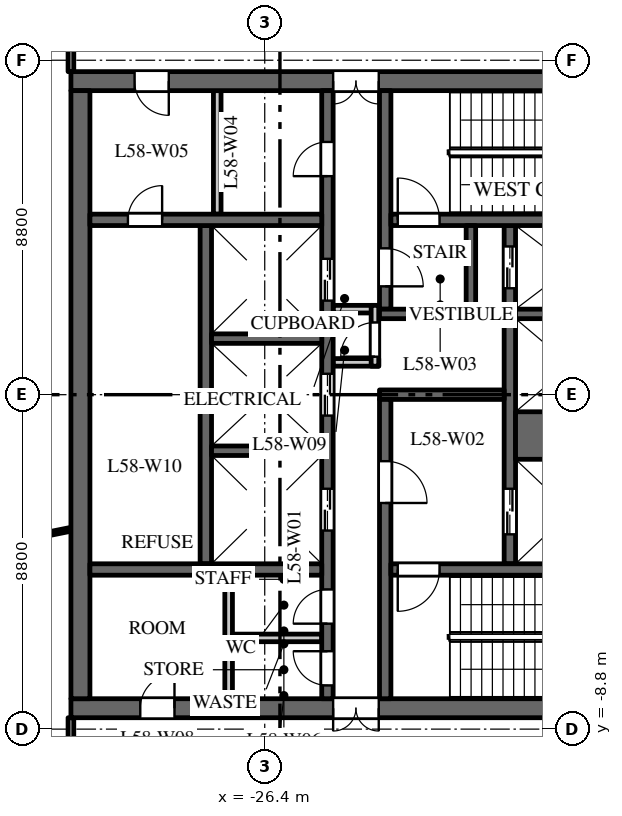
"""IFC4 building model, lengths in metres.
Left out: names, types, materials, properties, quantities, classifications, styles, units other than length and angle.
Written with IfcOpenShell. Run it as: python <this file> out.ifc"""

import sys

from ifc_helpers import new_model, si_unit, direction, frame, frame_2d, origin, place, context, subcontext, project, spatial, rectangle, extrude, element, fill, save


model = new_model("IFC4")
c1 = context("Model", 3, precision=1e-05, world=origin(), true_north=direction((0.0, 1.0)))
c2 = subcontext(c1, "Body", "Model", "MODEL_VIEW")
j1 = project(units=[si_unit("LENGTHUNIT", "METRE"), si_unit("PLANEANGLEUNIT", "RADIAN")], contexts=[c1])
p1 = place(None, origin())
s1 = spatial("IfcSite", under=j1, at=p1, CompositionType="ELEMENT")
p2 = place(p1, origin())
s2 = spatial("IfcBuilding", under=s1, at=p2, CompositionType="ELEMENT")
p3 = place(p2, frame((0.0, 0.0, 273.5)))
s3 = spatial("IfcBuildingStorey", under=s2, at=p3, CompositionType="ELEMENT", Elevation=273.5)
p4 = place(p3, frame((-16.5, 8.25, 0.0), z_axis=(0.0, 0.0, 1.0), x_axis=(-1.0, 0.0, 0.0)))
e1 = element("IfcWall", 1, at=p4, inside=s3, PredefinedType="SHEAR", context=c2, shape_type="SweptSolid", body=[
    extrude(rectangle(XDim=15.0, YDim=0.5, at=frame_2d((7.5, 0.0))), origin(), (0.0, 0.0, 1.0), 3.7),
])
p5 = place(p4, frame((6.9, 0.0, 0.0)))
e2 = element("IfcOpeningElement", 2, at=p5, cuts=e1, PredefinedType="OPENING", context=c2, shape_type="SweptSolid", body=[
    extrude(rectangle(XDim=1.2, YDim=2.1, at=frame_2d((0.6, 1.05))), frame((0.0, 0.26, 0.0), z_axis=(0.0, -1.0, 0.0), x_axis=(1.0, 0.0, 0.0)), (0.0, 0.0, 1.0), 0.52),
])
p6 = place(p4, frame((12.425, 0.0, 0.0)))
e3 = element("IfcOpeningElement", 3, at=p6, cuts=e1, PredefinedType="OPENING", context=c2, shape_type="SweptSolid", body=[
    extrude(rectangle(XDim=0.9, YDim=2.1, at=frame_2d((0.45, 1.05))), frame((0.0, 0.26, 0.0), z_axis=(0.0, -1.0, 0.0), x_axis=(1.0, 0.0, 0.0)), (0.0, 0.0, 1.0), 0.52),
])
p7 = place(p3, frame((-16.5, -8.25, 0.0), z_axis=(0.0, 0.0, 1.0), x_axis=(-1.0, 0.0, 0.0)))
e4 = element("IfcWall", 4, at=p7, inside=s3, PredefinedType="SHEAR", context=c2, shape_type="SweptSolid", body=[
    extrude(rectangle(XDim=15.0, YDim=0.5, at=frame_2d((7.5, 0.0))), origin(), (0.0, 0.0, 1.0), 3.7),
])
p8 = place(p7, frame((6.9, 0.0, 0.0)))
e5 = element("IfcOpeningElement", 5, at=p8, cuts=e4, PredefinedType="OPENING", context=c2, shape_type="SweptSolid", body=[
    extrude(rectangle(XDim=1.2, YDim=2.1, at=frame_2d((0.6, 1.05))), frame((0.0, 0.26, 0.0), z_axis=(0.0, -1.0, 0.0), x_axis=(1.0, 0.0, 0.0)), (0.0, 0.0, 1.0), 0.52),
])
p9 = place(p7, frame((12.275, 0.0, 0.0)))
e6 = element("IfcOpeningElement", 6, at=p9, cuts=e4, PredefinedType="OPENING", context=c2, shape_type="SweptSolid", body=[
    extrude(rectangle(XDim=0.9, YDim=2.1, at=frame_2d((0.45, 1.05))), frame((0.0, 0.26, 0.0), z_axis=(0.0, -1.0, 0.0), x_axis=(1.0, 0.0, 0.0)), (0.0, 0.0, 1.0), 0.52),
])
p10 = place(p3, frame((-27.95, -4.45, 0.0), z_axis=(0.0, 0.0, 1.0), x_axis=(0.0, 1.0, 0.0)))
e7 = element("IfcWall", 7, at=p10, inside=s3, PredefinedType="SHEAR", context=c2, shape_type="SweptSolid", body=[
    extrude(rectangle(XDim=8.9, YDim=0.3, at=frame_2d((4.45, 0.0))), origin(), (0.0, 0.0, 1.0), 3.7),
])
p11 = place(p3, frame((-19.95, -4.45, 0.0), z_axis=(0.0, 0.0, 1.0), x_axis=(0.0, 1.0, 0.0)))
e8 = element("IfcWall", 8, at=p11, inside=s3, PredefinedType="SHEAR", context=c2, shape_type="SweptSolid", body=[
    extrude(rectangle(XDim=8.9, YDim=0.3, at=frame_2d((4.45, 0.0))), origin(), (0.0, 0.0, 1.0), 3.7),
])
p12 = place(p11, frame((0.775, 0.0, 0.0)))
e9 = element("IfcOpeningElement", 9, at=p12, cuts=e8, PredefinedType="OPENING", context=c2, shape_type="SweptSolid", body=[
    extrude(rectangle(XDim=1.2, YDim=2.1, at=frame_2d((0.6, 1.05))), frame((0.0, 0.16, 0.0), z_axis=(0.0, -1.0, 0.0), x_axis=(1.0, 0.0, 0.0)), (0.0, 0.0, 1.0), 0.32),
])
p13 = place(p11, frame((7.25, 0.0, 0.0)))
e10 = element("IfcOpeningElement", 10, at=p13, cuts=e8, PredefinedType="OPENING", context=c2, shape_type="SweptSolid", body=[
    extrude(rectangle(XDim=1.1, YDim=2.1, at=frame_2d((0.55, 1.05))), frame((0.0, 0.16, 0.0), z_axis=(0.0, -1.0, 0.0), x_axis=(1.0, 0.0, 0.0)), (0.0, 0.0, 1.0), 0.32),
])
p14 = place(p3, frame((-24.75, -8.0, 0.0), z_axis=(0.0, 0.0, 1.0), x_axis=(0.0, 1.0, 0.0)))
e11 = element("IfcWall", 11, at=p14, inside=s3, PredefinedType="SHEAR", context=c2, shape_type="SweptSolid", body=[
    extrude(rectangle(XDim=16.0, YDim=0.3, at=frame_2d((8.0, 0.0))), origin(), (0.0, 0.0, 1.0), 3.7),
])
p15 = place(p14, frame((4.425, 0.0, 0.0)))
e12 = element("IfcOpeningElement", 12, at=p15, cuts=e11, PredefinedType="OPENING", context=c2, shape_type="SweptSolid", body=[
    extrude(rectangle(XDim=1.1, YDim=2.1, at=frame_2d((0.55, 1.05))), frame((0.0, 0.16, 0.0), z_axis=(0.0, -1.0, 0.0), x_axis=(1.0, 0.0, 0.0)), (0.0, 0.0, 1.0), 0.32),
])
p16 = place(p14, frame((7.45, 0.0, 0.0)))
e13 = element("IfcOpeningElement", 13, at=p16, cuts=e11, PredefinedType="OPENING", context=c2, shape_type="SweptSolid", body=[
    extrude(rectangle(XDim=1.1, YDim=2.1, at=frame_2d((0.55, 1.05))), frame((0.0, 0.16, 0.0), z_axis=(0.0, -1.0, 0.0), x_axis=(1.0, 0.0, 0.0)), (0.0, 0.0, 1.0), 0.32),
])
p17 = place(p14, frame((10.475, 0.0, 0.0)))
e14 = element("IfcOpeningElement", 14, at=p17, cuts=e11, PredefinedType="OPENING", context=c2, shape_type="SweptSolid", body=[
    extrude(rectangle(XDim=1.1, YDim=2.1, at=frame_2d((0.55, 1.05))), frame((0.0, 0.16, 0.0), z_axis=(0.0, -1.0, 0.0), x_axis=(1.0, 0.0, 0.0)), (0.0, 0.0, 1.0), 0.32),
])
p18 = place(p14, frame((13.75, 0.0, 0.0)))
e15 = element("IfcOpeningElement", 15, at=p18, cuts=e11, PredefinedType="OPENING", context=c2, shape_type="SweptSolid", body=[
    extrude(rectangle(XDim=0.9, YDim=2.1, at=frame_2d((0.45, 1.05))), frame((0.0, 0.16, 0.0), z_axis=(0.0, -1.0, 0.0), x_axis=(1.0, 0.0, 0.0)), (0.0, 0.0, 1.0), 0.32),
])
p19 = place(p14, frame((1.975, 0.0, 0.0)))
e16 = element("IfcOpeningElement", 16, at=p19, cuts=e11, PredefinedType="OPENING", context=c2, shape_type="SweptSolid", body=[
    extrude(rectangle(XDim=0.9, YDim=2.1, at=frame_2d((0.45, 1.05))), frame((0.0, 0.16, 0.0), z_axis=(0.0, -1.0, 0.0), x_axis=(1.0, 0.0, 0.0)), (0.0, 0.0, 1.0), 0.32),
])
p20 = place(p14, frame((0.35, 0.0, 0.0)))
e17 = element("IfcOpeningElement", 17, at=p20, cuts=e11, PredefinedType="OPENING", context=c2, shape_type="SweptSolid", body=[
    extrude(rectangle(XDim=0.9, YDim=2.1, at=frame_2d((0.45, 1.05))), frame((0.0, 0.16, 0.0), z_axis=(0.0, -1.0, 0.0), x_axis=(1.0, 0.0, 0.0)), (0.0, 0.0, 1.0), 0.32),
])
p21 = place(p3, frame((-20.1, 0.0, 0.0), z_axis=(0.0, 0.0, 1.0), x_axis=(-1.0, 0.0, 0.0)))
e18 = element("IfcWall", 18, at=p21, inside=s3, PredefinedType="SHEAR", context=c2, shape_type="SweptSolid", body=[
    extrude(rectangle(XDim=3.28, YDim=0.25, at=frame_2d((1.64, 0.0))), origin(), (0.0, 0.0, 1.0), 3.7),
])
for number, where, z_axis, x_axis in (
    (19, (-23.4, 0.85, 0.0), (0.0, 0.0, 1.0), (-1.0, 0.0, 0.0)),
    (20, (-23.4, 2.25, 0.0), (0.0, 0.0, 1.0), (-1.0, 0.0, 0.0)),
):
    element("IfcWall", number, at=place(p3, frame(where, z_axis=z_axis, x_axis=x_axis)), inside=s3, PredefinedType="PARTITIONING", context=c2, shape_type="SweptSolid", body=[
        extrude(rectangle(XDim=1.2, YDim=0.2, at=frame_2d((0.6, 0.0))), origin(), (0.0, 0.0, 1.0), 3.7),
    ])
p22 = place(p3, frame((-23.5, 0.75, 0.0), z_axis=(0.0, 0.0, 1.0), x_axis=(0.0, 1.0, 0.0)))
e21 = element("IfcWall", 21, at=p22, inside=s3, PredefinedType="PARTITIONING", context=c2, shape_type="SweptSolid", body=[
    extrude(rectangle(XDim=1.6, YDim=0.2, at=frame_2d((0.8, 0.0))), origin(), (0.0, 0.0, 1.0), 3.7),
])
p23 = place(p22, frame((0.25, 0.0, 0.0)))
e22 = element("IfcOpeningElement", 22, at=p23, cuts=e21, PredefinedType="OPENING", context=c2, shape_type="SweptSolid", body=[
    extrude(rectangle(XDim=0.9, YDim=2.1, at=frame_2d((0.45, 1.05))), frame((0.0, 0.11, 0.0), z_axis=(0.0, -1.0, 0.0), x_axis=(1.0, 0.0, 0.0)), (0.0, 0.0, 1.0), 0.22),
])
p24 = place(p3, frame((-31.25, -8.0, 0.0), z_axis=(0.0, 0.0, 1.0), x_axis=(0.0, 1.0, 0.0)))
e23 = element("IfcWall", 23, at=p24, inside=s3, PredefinedType="SHEAR", context=c2, shape_type="SweptSolid", body=[
    extrude(rectangle(XDim=16.0, YDim=0.5, at=frame_2d((8.0, 0.0))), origin(), (0.0, 0.0, 1.0), 3.7),
])
p25 = place(p3, frame((-24.9, 4.6, 0.0), z_axis=(0.0, 0.0, 1.0), x_axis=(-1.0, 0.0, 0.0)))
e24 = element("IfcWall", 24, at=p25, inside=s3, PredefinedType="SHEAR", context=c2, shape_type="SweptSolid", body=[
    extrude(rectangle(XDim=6.1, YDim=0.3, at=frame_2d((3.05, 0.0))), origin(), (0.0, 0.0, 1.0), 3.7),
])
p26 = place(p25, frame((4.2, 0.0, 0.0)))
e25 = element("IfcOpeningElement", 25, at=p26, cuts=e24, PredefinedType="OPENING", context=c2, shape_type="SweptSolid", body=[
    extrude(rectangle(XDim=0.9, YDim=2.1, at=frame_2d((0.45, 1.05))), frame((0.0, 0.16, 0.0), z_axis=(0.0, -1.0, 0.0), x_axis=(1.0, 0.0, 0.0)), (0.0, 0.0, 1.0), 0.32),
])
for number, where, z_axis, x_axis in (
    (26, (-27.65, 4.75, 0.0), (0.0, 0.0, 1.0), (0.0, 1.0, 0.0)),
    (27, (-27.35, -8.0, 0.0), (0.0, 0.0, 1.0), (0.0, 1.0, 0.0)),
):
    element("IfcWall", number, at=place(p3, frame(where, z_axis=z_axis, x_axis=x_axis)), inside=s3, PredefinedType="PARTITIONING", context=c2, shape_type="SweptSolid", body=[
        extrude(rectangle(XDim=3.25, YDim=0.2, at=frame_2d((1.625, 0.0))), origin(), (0.0, 0.0, 1.0), 3.7),
    ])
p27 = place(p3, frame((-24.9, -6.4, 0.0), z_axis=(0.0, 0.0, 1.0), x_axis=(-1.0, 0.0, 0.0)))
e28 = element("IfcWall", 28, at=p27, inside=s3, PredefinedType="PARTITIONING", context=c2, shape_type="SweptSolid", body=[
    extrude(rectangle(XDim=2.35, YDim=0.2, at=frame_2d((1.175, 0.0))), origin(), (0.0, 0.0, 1.0), 3.7),
])
p28 = place(p3, frame((-24.9, -4.6, 0.0), z_axis=(0.0, 0.0, 1.0), x_axis=(-1.0, 0.0, 0.0)))
e29 = element("IfcWall", 29, at=p28, inside=s3, PredefinedType="SHEAR", context=c2, shape_type="SweptSolid", body=[
    extrude(rectangle(XDim=6.1, YDim=0.3, at=frame_2d((3.05, 0.0))), origin(), (0.0, 0.0, 1.0), 3.7),
])
p29 = place(p3, frame((-16.9, -1.075, 0.0), z_axis=(0.0, 0.0, 1.0), x_axis=(-1.0, 0.0, 0.0)))
e30 = element("IfcWall", 30, at=p29, inside=s3, PredefinedType="SHEAR", context=c2, shape_type="SweptSolid", body=[
    extrude(rectangle(XDim=2.9, YDim=1.25, at=frame_2d((1.45, 0.0))), origin(), (0.0, 0.0, 1.0), 3.7),
])
for number, where, z_axis, x_axis in (
    (31, (-16.9, 2.125, 0.0), (0.0, 0.0, 1.0), (-1.0, 0.0, 0.0)),
    (32, (-24.9, -1.475, 0.0), (0.0, 0.0, 1.0), (-1.0, 0.0, 0.0)),
    (33, (-24.9, 1.475, 0.0), (0.0, 0.0, 1.0), (-1.0, 0.0, 0.0)),
):
    element("IfcWall", number, at=place(p3, frame(where, z_axis=z_axis, x_axis=x_axis)), inside=s3, PredefinedType="SHEAR", context=c2, shape_type="SweptSolid", body=[
        extrude(rectangle(XDim=2.9, YDim=0.25, at=frame_2d((1.45, 0.0))), origin(), (0.0, 0.0, 1.0), 3.7),
    ])
p30 = place(p3, frame((-23.23, 2.25, 0.0), z_axis=(0.0, 0.0, 1.0), x_axis=(0.0, 1.0, 0.0)))
e34 = element("IfcWall", 34, at=p30, inside=s3, PredefinedType="SHEAR", context=c2, shape_type="SweptSolid", body=[
    extrude(rectangle(XDim=5.75, YDim=0.3, at=frame_2d((2.875, 0.0))), origin(), (0.0, 0.0, 1.0), 3.7),
])
p31 = place(p30, frame((0.6, 0.0, 0.0)))
e35 = element("IfcOpeningElement", 35, at=p31, cuts=e34, PredefinedType="OPENING", context=c2, shape_type="SweptSolid", body=[
    extrude(rectangle(XDim=1.0, YDim=2.1, at=frame_2d((0.5, 1.05))), frame((0.0, 0.16, 0.0), z_axis=(0.0, -1.0, 0.0), x_axis=(1.0, 0.0, 0.0)), (0.0, 0.0, 1.0), 0.32),
])
p32 = place(p3, frame((-23.23, -8.0, 0.0), z_axis=(0.0, 0.0, 1.0), x_axis=(0.0, 1.0, 0.0)))
e36 = element("IfcWall", 36, at=p32, inside=s3, PredefinedType="SHEAR", context=c2, shape_type="SweptSolid", body=[
    extrude(rectangle(XDim=7.875, YDim=0.3, at=frame_2d((3.938, 0.0))), origin(), (0.0, 0.0, 1.0), 3.7),
])
p33 = place(p32, frame((5.15, 0.0, 0.0)))
e37 = element("IfcOpeningElement", 37, at=p33, cuts=e36, PredefinedType="OPENING", context=c2, shape_type="SweptSolid", body=[
    extrude(rectangle(XDim=1.1, YDim=2.1, at=frame_2d((0.55, 1.05))), frame((0.0, 0.16, 0.0), z_axis=(0.0, -1.0, 0.0), x_axis=(1.0, 0.0, 0.0)), (0.0, 0.0, 1.0), 0.32),
])
p34 = place(p3, frame((-16.9, 4.6, 0.0), z_axis=(0.0, 0.0, 1.0), x_axis=(-1.0, 0.0, 0.0)))
e38 = element("IfcWall", 38, at=p34, inside=s3, PredefinedType="SHEAR", context=c2, shape_type="SweptSolid", body=[
    extrude(rectangle(XDim=6.18, YDim=0.3, at=frame_2d((3.09, 0.0))), origin(), (0.0, 0.0, 1.0), 3.7),
])
p35 = place(p34, frame((4.9, 0.0, 0.0)))
e39 = element("IfcOpeningElement", 39, at=p35, cuts=e38, PredefinedType="OPENING", context=c2, shape_type="SweptSolid", body=[
    extrude(rectangle(XDim=1.1, YDim=2.1, at=frame_2d((0.55, 1.05))), frame((0.0, 0.16, 0.0), z_axis=(0.0, -1.0, 0.0), x_axis=(1.0, 0.0, 0.0)), (0.0, 0.0, 1.0), 0.32),
])
p36 = place(p3, frame((-16.9, -4.6, 0.0), z_axis=(0.0, 0.0, 1.0), x_axis=(-1.0, 0.0, 0.0)))
e40 = element("IfcWall", 40, at=p36, inside=s3, PredefinedType="SHEAR", context=c2, shape_type="SweptSolid", body=[
    extrude(rectangle(XDim=6.18, YDim=0.3, at=frame_2d((3.09, 0.0))), origin(), (0.0, 0.0, 1.0), 3.7),
])
p37 = place(p36, frame((4.9, 0.0, 0.0)))
e41 = element("IfcOpeningElement", 41, at=p37, cuts=e40, PredefinedType="OPENING", context=c2, shape_type="SweptSolid", body=[
    extrude(rectangle(XDim=1.1, YDim=2.1, at=frame_2d((0.55, 1.05))), frame((0.0, 0.16, 0.0), z_axis=(0.0, -1.0, 0.0), x_axis=(1.0, 0.0, 0.0)), (0.0, 0.0, 1.0), 0.32),
])
p38 = place(p3, frame((-20.85, 2.125, 0.0), z_axis=(0.0, 0.0, 1.0), x_axis=(-1.0, 0.0, 0.0)))
e42 = element("IfcWall", 42, at=p38, inside=s3, PredefinedType="SHEAR", context=c2, shape_type="SweptSolid", body=[
    extrude(rectangle(XDim=2.53, YDim=0.25, at=frame_2d((1.265, 0.0))), origin(), (0.0, 0.0, 1.0), 3.7),
])
p39 = place(p3, frame((-20.975, 2.25, 0.0), z_axis=(0.0, 0.0, 1.0), x_axis=(0.0, 1.0, 0.0)))
e43 = element("IfcWall", 43, at=p39, inside=s3, PredefinedType="SHEAR", context=c2, shape_type="SweptSolid", body=[
    extrude(rectangle(XDim=2.2, YDim=0.25, at=frame_2d((1.1, 0.0))), origin(), (0.0, 0.0, 1.0), 3.7),
])
p40 = place(p3, frame((-35.512, -4.349, 0.0), z_axis=(0.0, 0.0, 1.0), x_axis=(0.980357474535, 0.197228857227, 0.0)))
e44 = element("IfcWall", 44, at=p40, inside=s3, PredefinedType="PARTITIONING", context=c2, shape_type="SweptSolid", body=[
    extrude(rectangle(XDim=4.092, YDim=0.1, at=frame_2d((2.046, 0.0))), origin(), (0.0, 0.0, 1.0), 3.2),
])
p41 = place(p3, frame((-31.5, -10.7, 0.0), z_axis=(0.0, 0.0, 1.0), x_axis=(0.0, 1.0, 0.0)))
e45 = element("IfcWall", 45, at=p41, inside=s3, PredefinedType="PARTITIONING", context=c2, shape_type="SweptSolid", body=[
    extrude(rectangle(XDim=2.2, YDim=0.15, at=frame_2d((1.1, 0.0))), origin(), (0.0, 0.0, 1.0), 3.7),
])
p42 = place(p41, frame((0.55, 0.0, 0.0)))
e46 = element("IfcOpeningElement", 46, at=p42, cuts=e45, PredefinedType="OPENING", context=c2, shape_type="SweptSolid", body=[
    extrude(rectangle(XDim=1.0, YDim=2.1, at=frame_2d((0.5, 1.05))), frame((0.0, 0.085, 0.0), z_axis=(0.0, -1.0, 0.0), x_axis=(1.0, 0.0, 0.0)), (0.0, 0.0, 1.0), 0.17),
])
p43 = place(p3, frame((-31.5, 8.5, 0.0), z_axis=(0.0, 0.0, 1.0), x_axis=(0.0, 1.0, 0.0)))
e47 = element("IfcWall", 47, at=p43, inside=s3, PredefinedType="PARTITIONING", context=c2, shape_type="SweptSolid", body=[
    extrude(rectangle(XDim=2.2, YDim=0.15, at=frame_2d((1.1, 0.0))), origin(), (0.0, 0.0, 1.0), 3.7),
])
p44 = place(p43, frame((0.55, 0.0, 0.0)))
e48 = element("IfcOpeningElement", 48, at=p44, cuts=e47, PredefinedType="OPENING", context=c2, shape_type="SweptSolid", body=[
    extrude(rectangle(XDim=1.0, YDim=2.1, at=frame_2d((0.5, 1.05))), frame((0.0, 0.085, 0.0), z_axis=(0.0, -1.0, 0.0), x_axis=(1.0, 0.0, 0.0)), (0.0, 0.0, 1.0), 0.17),
])
p45 = place(p12, origin())
e49 = element("IfcDoor", 49, at=p45, inside=s3, OperationType="DOUBLE_DOOR_SLIDING", PredefinedType="DOOR", context=c2, shape_type="SweptSolid", body=[
    extrude(rectangle(XDim=1.2, YDim=2.1, at=frame_2d((0.6, 1.05))), frame((0.0, 0.025, 0.0), z_axis=(0.0, -1.0, 0.0), x_axis=(1.0, 0.0, 0.0)), (0.0, 0.0, 1.0), 0.05),
])
fill(e9, e49)
p46 = place(p13, origin())
e50 = element("IfcDoor", 50, at=p46, inside=s3, OperationType="DOUBLE_DOOR_SLIDING", PredefinedType="DOOR", context=c2, shape_type="SweptSolid", body=[
    extrude(rectangle(XDim=1.1, YDim=2.1, at=frame_2d((0.55, 1.05))), frame((0.0, 0.025, 0.0), z_axis=(0.0, -1.0, 0.0), x_axis=(1.0, 0.0, 0.0)), (0.0, 0.0, 1.0), 0.05),
])
fill(e10, e50)
p47 = place(p15, origin())
e51 = element("IfcDoor", 51, at=p47, inside=s3, OperationType="DOUBLE_DOOR_SLIDING", PredefinedType="DOOR", context=c2, shape_type="SweptSolid", body=[
    extrude(rectangle(XDim=1.1, YDim=2.1, at=frame_2d((0.55, 1.05))), frame((0.0, 0.025, 0.0), z_axis=(0.0, -1.0, 0.0), x_axis=(1.0, 0.0, 0.0)), (0.0, 0.0, 1.0), 0.05),
])
fill(e12, e51)
p48 = place(p16, origin())
e52 = element("IfcDoor", 52, at=p48, inside=s3, OperationType="DOUBLE_DOOR_SLIDING", PredefinedType="DOOR", context=c2, shape_type="SweptSolid", body=[
    extrude(rectangle(XDim=1.1, YDim=2.1, at=frame_2d((0.55, 1.05))), frame((0.0, 0.025, 0.0), z_axis=(0.0, -1.0, 0.0), x_axis=(1.0, 0.0, 0.0)), (0.0, 0.0, 1.0), 0.05),
])
fill(e13, e52)
p49 = place(p17, origin())
e53 = element("IfcDoor", 53, at=p49, inside=s3, OperationType="DOUBLE_DOOR_SLIDING", PredefinedType="DOOR", context=c2, shape_type="SweptSolid", body=[
    extrude(rectangle(XDim=1.1, YDim=2.1, at=frame_2d((0.55, 1.05))), frame((0.0, 0.025, 0.0), z_axis=(0.0, -1.0, 0.0), x_axis=(1.0, 0.0, 0.0)), (0.0, 0.0, 1.0), 0.05),
])
fill(e14, e53)
p50 = place(p35, origin())
e54 = element("IfcDoor", 54, at=p50, inside=s3, OperationType="SINGLE_SWING_RIGHT", PredefinedType="DOOR", context=c2, shape_type="SweptSolid", body=[
    extrude(rectangle(XDim=1.1, YDim=2.1, at=frame_2d((0.55, 1.05))), frame((0.0, 0.025, 0.0), z_axis=(0.0, -1.0, 0.0), x_axis=(1.0, 0.0, 0.0)), (0.0, 0.0, 1.0), 0.05),
])
fill(e39, e54)
p51 = place(p37, origin())
e55 = element("IfcDoor", 55, at=p51, inside=s3, OperationType="SINGLE_SWING_LEFT", PredefinedType="DOOR", context=c2, shape_type="SweptSolid", body=[
    extrude(rectangle(XDim=1.1, YDim=2.1, at=frame_2d((0.55, 1.05))), frame((0.0, 0.025, 0.0), z_axis=(0.0, -1.0, 0.0), x_axis=(1.0, 0.0, 0.0)), (0.0, 0.0, 1.0), 0.05),
])
fill(e41, e55)
p52 = place(p33, origin())
e56 = element("IfcDoor", 56, at=p52, inside=s3, OperationType="SINGLE_SWING_LEFT", PredefinedType="DOOR", context=c2, shape_type="SweptSolid", body=[
    extrude(rectangle(XDim=1.1, YDim=2.1, at=frame_2d((0.55, 1.05))), frame((0.0, 0.025, 0.0), z_axis=(0.0, -1.0, 0.0), x_axis=(1.0, 0.0, 0.0)), (0.0, 0.0, 1.0), 0.05),
])
fill(e37, e56)
p53 = place(p31, origin())
e57 = element("IfcDoor", 57, at=p53, inside=s3, OperationType="SINGLE_SWING_LEFT", PredefinedType="DOOR", context=c2, shape_type="SweptSolid", body=[
    extrude(rectangle(XDim=1.0, YDim=2.1, at=frame_2d((0.5, 1.05))), frame((0.0, 0.025, 0.0), z_axis=(0.0, -1.0, 0.0), x_axis=(1.0, 0.0, 0.0)), (0.0, 0.0, 1.0), 0.05),
])
fill(e35, e57)
p54 = place(p5, origin())
e58 = element("IfcDoor", 58, at=p54, inside=s3, OperationType="DOUBLE_DOOR_DOUBLE_SWING", PredefinedType="DOOR", context=c2, shape_type="SweptSolid", body=[
    extrude(rectangle(XDim=1.2, YDim=2.1, at=frame_2d((0.6, 1.05))), frame((0.0, 0.025, 0.0), z_axis=(0.0, -1.0, 0.0), x_axis=(1.0, 0.0, 0.0)), (0.0, 0.0, 1.0), 0.05),
])
fill(e2, e58)
p55 = place(p8, origin())
e59 = element("IfcDoor", 59, at=p55, inside=s3, OperationType="DOUBLE_DOOR_DOUBLE_SWING", PredefinedType="DOOR", context=c2, shape_type="SweptSolid", body=[
    extrude(rectangle(XDim=1.2, YDim=2.1, at=frame_2d((0.6, 1.05))), frame((0.0, 0.025, 0.0), z_axis=(0.0, -1.0, 0.0), x_axis=(1.0, 0.0, 0.0)), (0.0, 0.0, 1.0), 0.05),
])
fill(e5, e59)
p56 = place(p18, origin())
e60 = element("IfcDoor", 60, at=p56, inside=s3, OperationType="SINGLE_SWING_RIGHT", PredefinedType="DOOR", context=c2, shape_type="SweptSolid", body=[
    extrude(rectangle(XDim=0.9, YDim=2.1, at=frame_2d((0.45, 1.05))), frame((0.0, 0.025, 0.0), z_axis=(0.0, -1.0, 0.0), x_axis=(1.0, 0.0, 0.0)), (0.0, 0.0, 1.0), 0.05),
])
fill(e15, e60)
p57 = place(p6, origin())
e61 = element("IfcDoor", 61, at=p57, inside=s3, OperationType="SINGLE_SWING_RIGHT", PredefinedType="DOOR", context=c2, shape_type="SweptSolid", body=[
    extrude(rectangle(XDim=0.9, YDim=2.1, at=frame_2d((0.45, 1.05))), frame((0.0, 0.025, 0.0), z_axis=(0.0, -1.0, 0.0), x_axis=(1.0, 0.0, 0.0)), (0.0, 0.0, 1.0), 0.05),
])
fill(e3, e61)
p58 = place(p19, origin())
e62 = element("IfcDoor", 62, at=p58, inside=s3, OperationType="SINGLE_SWING_RIGHT", PredefinedType="DOOR", context=c2, shape_type="SweptSolid", body=[
    extrude(rectangle(XDim=0.9, YDim=2.1, at=frame_2d((0.45, 1.05))), frame((0.0, 0.025, 0.0), z_axis=(0.0, -1.0, 0.0), x_axis=(1.0, 0.0, 0.0)), (0.0, 0.0, 1.0), 0.05),
])
fill(e16, e62)
p59 = place(p20, origin())
e63 = element("IfcDoor", 63, at=p59, inside=s3, OperationType="SINGLE_SWING_LEFT", PredefinedType="DOOR", context=c2, shape_type="SweptSolid", body=[
    extrude(rectangle(XDim=0.9, YDim=2.1, at=frame_2d((0.45, 1.05))), frame((0.0, 0.025, 0.0), z_axis=(0.0, -1.0, 0.0), x_axis=(1.0, 0.0, 0.0)), (0.0, 0.0, 1.0), 0.05),
])
fill(e17, e63)
p60 = place(p9, origin())
e64 = element("IfcDoor", 64, at=p60, inside=s3, OperationType="SINGLE_SWING_LEFT", PredefinedType="DOOR", context=c2, shape_type="SweptSolid", body=[
    extrude(rectangle(XDim=0.9, YDim=2.1, at=frame_2d((0.45, 1.05))), frame((0.0, 0.025, 0.0), z_axis=(0.0, -1.0, 0.0), x_axis=(1.0, 0.0, 0.0)), (0.0, 0.0, 1.0), 0.05),
])
fill(e6, e64)
p61 = place(p23, origin())
e65 = element("IfcDoor", 65, at=p61, inside=s3, OperationType="SINGLE_SWING_RIGHT", PredefinedType="DOOR", context=c2, shape_type="SweptSolid", body=[
    extrude(rectangle(XDim=0.9, YDim=2.1, at=frame_2d((0.45, 1.05))), frame((0.0, 0.025, 0.0), z_axis=(0.0, -1.0, 0.0), x_axis=(1.0, 0.0, 0.0)), (0.0, 0.0, 1.0), 0.05),
])
fill(e22, e65)
p62 = place(p26, origin())
e66 = element("IfcDoor", 66, at=p62, inside=s3, OperationType="SINGLE_SWING_LEFT", PredefinedType="DOOR", context=c2, shape_type="SweptSolid", body=[
    extrude(rectangle(XDim=0.9, YDim=2.1, at=frame_2d((0.45, 1.05))), frame((0.0, 0.025, 0.0), z_axis=(0.0, -1.0, 0.0), x_axis=(1.0, 0.0, 0.0)), (0.0, 0.0, 1.0), 0.05),
])
fill(e25, e66)
save(model, sys.argv[1])
